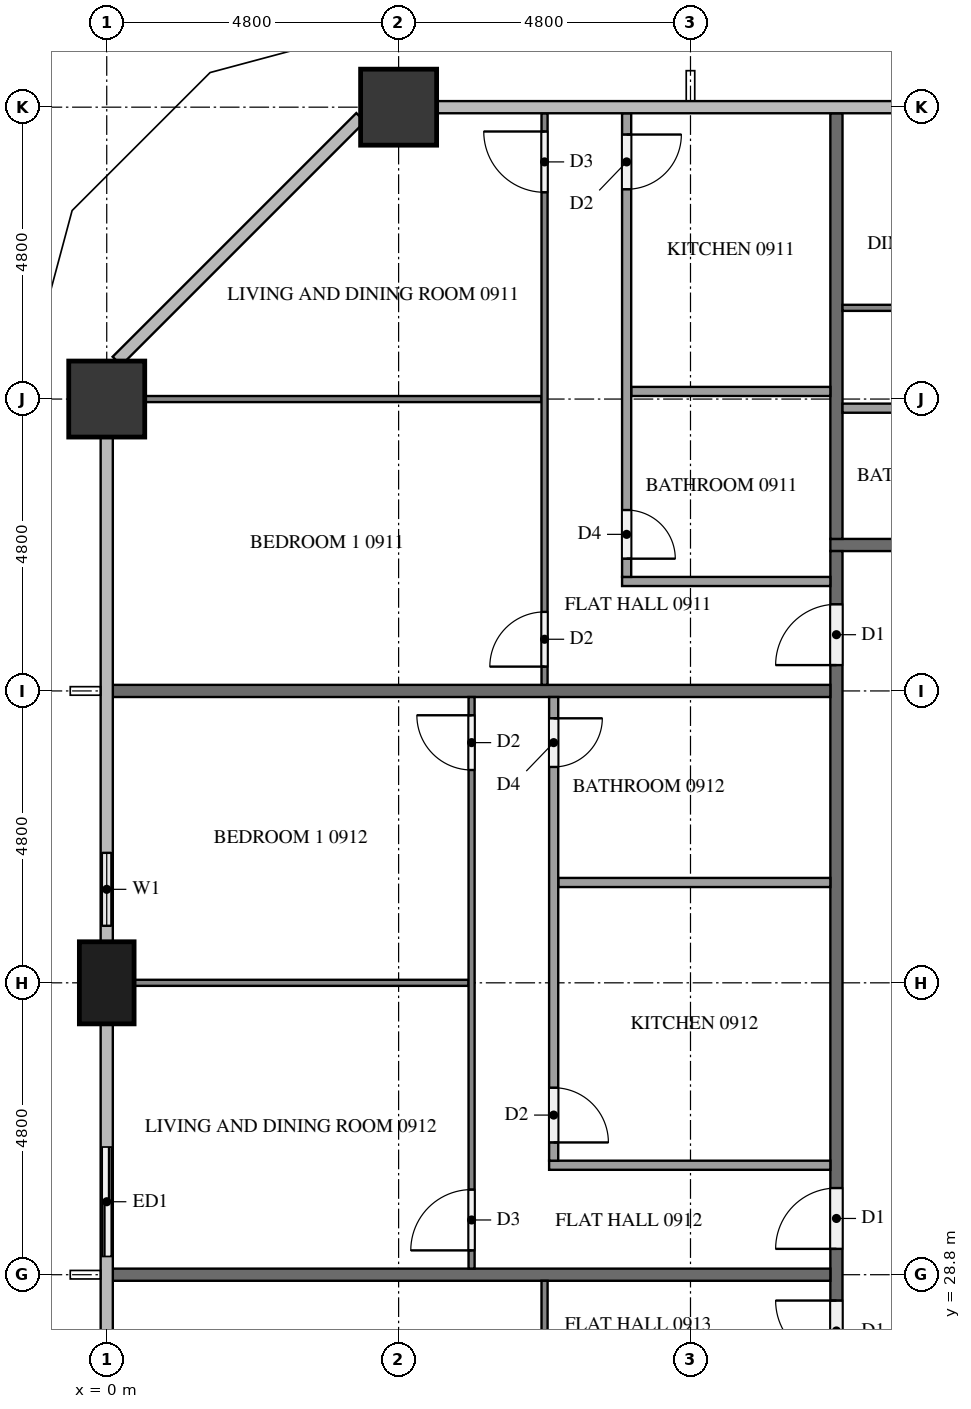
"""IFC4 building model, lengths in metres.
Left out: names, types, materials, properties, quantities, classifications, styles, units other than length and angle.
Written with IfcOpenShell. Run it as: python <this file> out.ifc"""

import sys

from ifc_helpers import new_model, si_unit, direction, frame, frame_2d, origin, origin_2d, place, context, subcontext, project, spatial, rectangle, extrude, element, fill, save


model = new_model("IFC4")
c1 = context("Model", 3, precision=1e-05, world=origin(), true_north=direction((0.0, 1.0)))
c2 = subcontext(c1, "Body", "Model", "MODEL_VIEW")
j1 = project(units=[si_unit("LENGTHUNIT", "METRE"), si_unit("PLANEANGLEUNIT", "RADIAN")], contexts=[c1])
p1 = place(None, origin())
s1 = spatial("IfcSite", under=j1, at=p1, CompositionType="ELEMENT")
p2 = place(p1, origin())
s2 = spatial("IfcBuilding", under=s1, at=p2, CompositionType="ELEMENT")
p3 = place(p2, frame((0.0, 0.0, 39.9)))
s3 = spatial("IfcBuildingStorey", under=s2, at=p3, CompositionType="ELEMENT", Elevation=39.9)
for number, where, z_axis, x_axis in (
    (1, (4.8, 48.0, 0.0), (0.0, 0.0, 1.0), (1.0, 0.0, 0.0)),
    (2, (0.0, 43.2, 0.0), (0.0, 0.0, 1.0), (1.0, 0.0, 0.0)),
):
    element("IfcColumn", number, at=place(p3, frame(where, z_axis=z_axis, x_axis=x_axis)), inside=s3, PredefinedType="COLUMN", context=c2, shape_type="SweptSolid", body=[
        extrude(rectangle(XDim=1.25, YDim=1.25, at=origin_2d()), origin(), (0.0, 0.0, 1.0), 3.2),
    ])
p4 = place(p3, frame((0.0, 33.6, 0.0), z_axis=(0.0, 0.0, 1.0), x_axis=(0.0, 1.0, 0.0)))
e3 = element("IfcColumn", 3, at=p4, inside=s3, PredefinedType="COLUMN", context=c2, shape_type="SweptSolid", body=[
    extrude(rectangle(XDim=1.35, YDim=0.9, at=origin_2d()), origin(), (0.0, 0.0, 1.0), 3.2),
])
p5 = place(p3, frame((0.0, 36.0, 0.0), z_axis=(0.0, 0.0, 1.0), x_axis=(0.0, -1.0, 0.0)))
e4 = element("IfcWall", 4, at=p5, inside=s3, PredefinedType="SOLIDWALL", context=c2, shape_type="SweptSolid", body=[
    extrude(rectangle(XDim=1.725, YDim=0.15, at=frame_2d((0.863, 0.0))), origin(), (0.0, 0.0, 1.0), 3.2),
])
p6 = place(p5, frame((0.262, 0.0, 0.9)))
e5 = element("IfcOpeningElement", 5, at=p6, cuts=e4, PredefinedType="OPENING", context=c2, shape_type="SweptSolid", body=[
    extrude(rectangle(XDim=1.2, YDim=1.4, at=frame_2d((0.6, 0.7))), frame((0.0, 0.085, 0.0), z_axis=(0.0, -1.0, 0.0), x_axis=(1.0, 0.0, 0.0)), (0.0, 0.0, 1.0), 0.17),
])
p7 = place(p3, frame((0.0, 31.2, 0.0), z_axis=(0.0, 0.0, 1.0), x_axis=(0.0, -1.0, 0.0)))
e6 = element("IfcWall", 6, at=p7, inside=s3, PredefinedType="SOLIDWALL", context=c2, shape_type="SweptSolid", body=[
    extrude(rectangle(XDim=2.4, YDim=0.15, at=frame_2d((1.2, 0.0))), origin(), (0.0, 0.0, 1.0), 3.2),
])
p8 = place(p7, frame((0.3, 0.0, 0.0)))
e7 = element("IfcOpeningElement", 7, at=p8, cuts=e6, PredefinedType="OPENING", context=c2, shape_type="SweptSolid", body=[
    extrude(rectangle(XDim=1.8, YDim=2.4, at=frame_2d((0.9, 1.2))), frame((0.0, 0.085, 0.0), z_axis=(0.0, -1.0, 0.0), x_axis=(1.0, 0.0, 0.0)), (0.0, 0.0, 1.0), 0.17),
])
p9 = place(p3, frame((11.9, 40.8, 0.0), z_axis=(0.0, 0.0, 1.0), x_axis=(1.0, 0.0, 0.0)))
e8 = element("IfcWall", 8, at=p9, inside=s3, PredefinedType="PARTITIONING", context=c2, shape_type="SweptSolid", body=[
    extrude(rectangle(XDim=38.6, YDim=0.2, at=frame_2d((19.3, 0.0))), origin(), (0.0, 0.0, 1.0), 3.2),
])
p10 = place(p9, frame((22.125, 0.0, 0.0)))
e9 = element("IfcOpeningElement", 9, at=p10, cuts=e8, PredefinedType="OPENING", context=c2, shape_type="SweptSolid", body=[
    extrude(rectangle(XDim=1.0, YDim=2.1, at=frame_2d((0.5, 1.05))), frame((0.0, 0.11, 0.0), z_axis=(0.0, -1.0, 0.0), x_axis=(1.0, 0.0, 0.0)), (0.0, 0.0, 1.0), 0.22),
])
p11 = place(p9, frame((10.125, 0.0, 0.0)))
e10 = element("IfcOpeningElement", 10, at=p11, cuts=e8, PredefinedType="OPENING", context=c2, shape_type="SweptSolid", body=[
    extrude(rectangle(XDim=1.0, YDim=2.1, at=frame_2d((0.5, 1.05))), frame((0.0, 0.11, 0.0), z_axis=(0.0, -1.0, 0.0), x_axis=(1.0, 0.0, 0.0)), (0.0, 0.0, 1.0), 0.22),
])
p12 = place(p9, frame((8.275, 0.0, 0.0)))
e11 = element("IfcOpeningElement", 11, at=p12, cuts=e8, PredefinedType="OPENING", context=c2, shape_type="SweptSolid", body=[
    extrude(rectangle(XDim=1.0, YDim=2.1, at=frame_2d((0.5, 1.05))), frame((0.0, 0.11, 0.0), z_axis=(0.0, -1.0, 0.0), x_axis=(1.0, 0.0, 0.0)), (0.0, 0.0, 1.0), 0.22),
])
p13 = place(p3, frame((12.0, 12.1, 0.0), z_axis=(0.0, 0.0, 1.0), x_axis=(0.0, 1.0, 0.0)))
e12 = element("IfcWall", 12, at=p13, inside=s3, PredefinedType="PARTITIONING", context=c2, shape_type="SweptSolid", body=[
    extrude(rectangle(XDim=28.6, YDim=0.2, at=frame_2d((14.3, 0.0))), origin(), (0.0, 0.0, 1.0), 3.2),
])
p14 = place(p13, frame((26.725, 0.0, 0.0)))
e13 = element("IfcOpeningElement", 13, at=p14, cuts=e12, PredefinedType="OPENING", context=c2, shape_type="SweptSolid", body=[
    extrude(rectangle(XDim=1.0, YDim=2.1, at=frame_2d((0.5, 1.05))), frame((0.0, 0.11, 0.0), z_axis=(0.0, -1.0, 0.0), x_axis=(1.0, 0.0, 0.0)), (0.0, 0.0, 1.0), 0.22),
])
p15 = place(p13, frame((17.125, 0.0, 0.0)))
e14 = element("IfcOpeningElement", 14, at=p15, cuts=e12, PredefinedType="OPENING", context=c2, shape_type="SweptSolid", body=[
    extrude(rectangle(XDim=1.0, YDim=2.1, at=frame_2d((0.5, 1.05))), frame((0.0, 0.11, 0.0), z_axis=(0.0, -1.0, 0.0), x_axis=(1.0, 0.0, 0.0)), (0.0, 0.0, 1.0), 0.22),
])
p16 = place(p13, frame((15.275, 0.0, 0.0)))
e15 = element("IfcOpeningElement", 15, at=p16, cuts=e12, PredefinedType="OPENING", context=c2, shape_type="SweptSolid", body=[
    extrude(rectangle(XDim=1.0, YDim=2.1, at=frame_2d((0.5, 1.05))), frame((0.0, 0.11, 0.0), z_axis=(0.0, -1.0, 0.0), x_axis=(1.0, 0.0, 0.0)), (0.0, 0.0, 1.0), 0.22),
])
p17 = place(p13, frame((5.675, 0.0, 0.0)))
e16 = element("IfcOpeningElement", 16, at=p17, cuts=e12, PredefinedType="OPENING", context=c2, shape_type="SweptSolid", body=[
    extrude(rectangle(XDim=1.0, YDim=2.1, at=frame_2d((0.5, 1.05))), frame((0.0, 0.11, 0.0), z_axis=(0.0, -1.0, 0.0), x_axis=(1.0, 0.0, 0.0)), (0.0, 0.0, 1.0), 0.22),
])
p18 = place(p3, frame((12.0, 47.9, 0.0), z_axis=(0.0, 0.0, 1.0), x_axis=(0.0, -1.0, 0.0)))
e17 = element("IfcWall", 17, at=p18, inside=s3, PredefinedType="PARTITIONING", context=c2, shape_type="SweptSolid", body=[
    extrude(rectangle(XDim=7.0, YDim=0.2, at=frame_2d((3.5, 0.0))), origin(), (0.0, 0.0, 1.0), 3.2),
])
for number, where, z_axis, x_axis in (
    (18, (0.1, 38.4, 0.0), (0.0, 0.0, 1.0), (1.0, 0.0, 0.0)),
    (19, (0.1, 28.8, 0.0), (0.0, 0.0, 1.0), (1.0, 0.0, 0.0)),
):
    element("IfcWall", number, at=place(p3, frame(where, z_axis=z_axis, x_axis=x_axis)), inside=s3, PredefinedType="PARTITIONING", context=c2, shape_type="SweptSolid", body=[
        extrude(rectangle(XDim=11.8, YDim=0.2, at=frame_2d((5.9, 0.0))), origin(), (0.0, 0.0, 1.0), 3.2),
    ])
p19 = place(p3, frame((12.1, 44.7, 0.0), z_axis=(0.0, 0.0, 1.0), x_axis=(1.0, 0.0, 0.0)))
e20 = element("IfcWall", 20, at=p19, inside=s3, PredefinedType="PARTITIONING", context=c2, shape_type="SweptSolid", body=[
    extrude(rectangle(XDim=9.4, YDim=0.1, at=frame_2d((4.7, 0.0))), origin(), (0.0, 0.0, 1.0), 3.2),
])
p20 = place(p19, frame((5.05, 0.0, 0.0)))
e21 = element("IfcOpeningElement", 21, at=p20, cuts=e20, PredefinedType="OPENING", context=c2, shape_type="SweptSolid", body=[
    extrude(rectangle(XDim=0.9, YDim=2.1, at=frame_2d((0.45, 1.05))), frame((0.0, 0.06, 0.0), z_axis=(0.0, -1.0, 0.0), x_axis=(1.0, 0.0, 0.0)), (0.0, 0.0, 1.0), 0.12),
])
p21 = place(p19, frame((3.35, 0.0, 0.0)))
e22 = element("IfcOpeningElement", 22, at=p21, cuts=e20, PredefinedType="OPENING", context=c2, shape_type="SweptSolid", body=[
    extrude(rectangle(XDim=1.0, YDim=2.1, at=frame_2d((0.5, 1.05))), frame((0.0, 0.06, 0.0), z_axis=(0.0, -1.0, 0.0), x_axis=(1.0, 0.0, 0.0)), (0.0, 0.0, 1.0), 0.12),
])
p22 = place(p3, frame((19.725, 43.05, 0.0), z_axis=(0.0, 0.0, 1.0), x_axis=(-1.0, 0.0, 0.0)))
e23 = element("IfcWall", 23, at=p22, inside=s3, PredefinedType="PARTITIONING", context=c2, shape_type="SweptSolid", body=[
    extrude(rectangle(XDim=7.625, YDim=0.15, at=frame_2d((3.812, 0.0))), origin(), (0.0, 0.0, 1.0), 3.2),
])
p23 = place(p22, frame((3.35, 0.0, 0.0)))
e24 = element("IfcOpeningElement", 24, at=p23, cuts=e23, PredefinedType="OPENING", context=c2, shape_type="SweptSolid", body=[
    extrude(rectangle(XDim=0.9, YDim=2.1, at=frame_2d((0.45, 1.05))), frame((0.0, 0.085, 0.0), z_axis=(0.0, -1.0, 0.0), x_axis=(1.0, 0.0, 0.0)), (0.0, 0.0, 1.0), 0.17),
])
p24 = place(p22, frame((4.9, 0.0, 0.0)))
e25 = element("IfcOpeningElement", 25, at=p24, cuts=e23, PredefinedType="OPENING", context=c2, shape_type="SweptSolid", body=[
    extrude(rectangle(XDim=0.8, YDim=2.1, at=frame_2d((0.4, 1.05))), frame((0.0, 0.085, 0.0), z_axis=(0.0, -1.0, 0.0), x_axis=(1.0, 0.0, 0.0)), (0.0, 0.0, 1.0), 0.17),
])
p25 = place(p3, frame((7.15, 43.2, 0.0), z_axis=(0.0, 0.0, 1.0), x_axis=(-1.0, 0.0, 0.0)))
e26 = element("IfcWall", 26, at=p25, inside=s3, PredefinedType="PARTITIONING", context=c2, shape_type="SweptSolid", body=[
    extrude(rectangle(XDim=6.525, YDim=0.1, at=frame_2d((3.262, 0.0))), origin(), (0.0, 0.0, 1.0), 3.2),
])
p26 = place(p3, frame((7.2, 38.5, 0.0), z_axis=(0.0, 0.0, 1.0), x_axis=(0.0, 1.0, 0.0)))
e27 = element("IfcWall", 27, at=p26, inside=s3, PredefinedType="PARTITIONING", context=c2, shape_type="SweptSolid", body=[
    extrude(rectangle(XDim=9.4, YDim=0.1, at=frame_2d((4.7, 0.0))), origin(), (0.0, 0.0, 1.0), 3.2),
])
p27 = place(p26, frame((0.3, 0.0, 0.0)))
e28 = element("IfcOpeningElement", 28, at=p27, cuts=e27, PredefinedType="OPENING", context=c2, shape_type="SweptSolid", body=[
    extrude(rectangle(XDim=0.9, YDim=2.1, at=frame_2d((0.45, 1.05))), frame((0.0, 0.06, 0.0), z_axis=(0.0, -1.0, 0.0), x_axis=(1.0, 0.0, 0.0)), (0.0, 0.0, 1.0), 0.12),
])
p28 = place(p26, frame((8.1, 0.0, 0.0)))
e29 = element("IfcOpeningElement", 29, at=p28, cuts=e27, PredefinedType="OPENING", context=c2, shape_type="SweptSolid", body=[
    extrude(rectangle(XDim=1.0, YDim=2.1, at=frame_2d((0.5, 1.05))), frame((0.0, 0.06, 0.0), z_axis=(0.0, -1.0, 0.0), x_axis=(1.0, 0.0, 0.0)), (0.0, 0.0, 1.0), 0.12),
])
p29 = place(p3, frame((11.9, 43.325, 0.0), z_axis=(0.0, 0.0, 1.0), x_axis=(-1.0, 0.0, 0.0)))
e30 = element("IfcWall", 30, at=p29, inside=s3, PredefinedType="PARTITIONING", context=c2, shape_type="SweptSolid", body=[
    extrude(rectangle(XDim=3.275, YDim=0.15, at=frame_2d((1.637, 0.0))), origin(), (0.0, 0.0, 1.0), 3.2),
])
p30 = place(p3, frame((11.9, 40.2, 0.0), z_axis=(0.0, 0.0, 1.0), x_axis=(-1.0, 0.0, 0.0)))
e31 = element("IfcWall", 31, at=p30, inside=s3, PredefinedType="PARTITIONING", context=c2, shape_type="SweptSolid", body=[
    extrude(rectangle(XDim=3.425, YDim=0.15, at=frame_2d((1.712, 0.0))), origin(), (0.0, 0.0, 1.0), 3.2),
])
p31 = place(p3, frame((8.55, 47.9, 0.0), z_axis=(0.0, 0.0, 1.0), x_axis=(0.0, -1.0, 0.0)))
e32 = element("IfcWall", 32, at=p31, inside=s3, PredefinedType="PARTITIONING", context=c2, shape_type="SweptSolid", body=[
    extrude(rectangle(XDim=7.625, YDim=0.15, at=frame_2d((3.812, 0.0))), origin(), (0.0, 0.0, 1.0), 3.2),
])
p32 = place(p31, frame((6.525, 0.0, 0.0)))
e33 = element("IfcOpeningElement", 33, at=p32, cuts=e32, PredefinedType="OPENING", context=c2, shape_type="SweptSolid", body=[
    extrude(rectangle(XDim=0.8, YDim=2.1, at=frame_2d((0.4, 1.05))), frame((0.0, 0.085, 0.0), z_axis=(0.0, -1.0, 0.0), x_axis=(1.0, 0.0, 0.0)), (0.0, 0.0, 1.0), 0.17),
])
p33 = place(p31, frame((0.35, 0.0, 0.0)))
e34 = element("IfcOpeningElement", 34, at=p33, cuts=e32, PredefinedType="OPENING", context=c2, shape_type="SweptSolid", body=[
    extrude(rectangle(XDim=0.9, YDim=2.1, at=frame_2d((0.45, 1.05))), frame((0.0, 0.085, 0.0), z_axis=(0.0, -1.0, 0.0), x_axis=(1.0, 0.0, 0.0)), (0.0, 0.0, 1.0), 0.17),
])
p34 = place(p3, frame((5.95, 33.6, 0.0), z_axis=(0.0, 0.0, 1.0), x_axis=(-1.0, 0.0, 0.0)))
e35 = element("IfcWall", 35, at=p34, inside=s3, PredefinedType="PARTITIONING", context=c2, shape_type="SweptSolid", body=[
    extrude(rectangle(XDim=5.5, YDim=0.1, at=frame_2d((2.75, 0.0))), origin(), (0.0, 0.0, 1.0), 3.2),
])
p35 = place(p3, frame((6.0, 28.9, 0.0), z_axis=(0.0, 0.0, 1.0), x_axis=(0.0, 1.0, 0.0)))
e36 = element("IfcWall", 36, at=p35, inside=s3, PredefinedType="PARTITIONING", context=c2, shape_type="SweptSolid", body=[
    extrude(rectangle(XDim=9.4, YDim=0.1, at=frame_2d((4.7, 0.0))), origin(), (0.0, 0.0, 1.0), 3.2),
])
p36 = place(p35, frame((0.3, 0.0, 0.0)))
e37 = element("IfcOpeningElement", 37, at=p36, cuts=e36, PredefinedType="OPENING", context=c2, shape_type="SweptSolid", body=[
    extrude(rectangle(XDim=1.0, YDim=2.1, at=frame_2d((0.5, 1.05))), frame((0.0, 0.06, 0.0), z_axis=(0.0, -1.0, 0.0), x_axis=(1.0, 0.0, 0.0)), (0.0, 0.0, 1.0), 0.12),
])
p37 = place(p35, frame((8.2, 0.0, 0.0)))
e38 = element("IfcOpeningElement", 38, at=p37, cuts=e36, PredefinedType="OPENING", context=c2, shape_type="SweptSolid", body=[
    extrude(rectangle(XDim=0.9, YDim=2.1, at=frame_2d((0.45, 1.05))), frame((0.0, 0.06, 0.0), z_axis=(0.0, -1.0, 0.0), x_axis=(1.0, 0.0, 0.0)), (0.0, 0.0, 1.0), 0.12),
])
p38 = place(p3, frame((11.9, 35.25, 0.0), z_axis=(0.0, 0.0, 1.0), x_axis=(-1.0, 0.0, 0.0)))
e39 = element("IfcWall", 39, at=p38, inside=s3, PredefinedType="PARTITIONING", context=c2, shape_type="SweptSolid", body=[
    extrude(rectangle(XDim=4.475, YDim=0.15, at=frame_2d((2.237, 0.0))), origin(), (0.0, 0.0, 1.0), 3.2),
])
p39 = place(p3, frame((11.9, 30.6, 0.0), z_axis=(0.0, 0.0, 1.0), x_axis=(-1.0, 0.0, 0.0)))
e40 = element("IfcWall", 40, at=p39, inside=s3, PredefinedType="PARTITIONING", context=c2, shape_type="SweptSolid", body=[
    extrude(rectangle(XDim=4.625, YDim=0.15, at=frame_2d((2.312, 0.0))), origin(), (0.0, 0.0, 1.0), 3.2),
])
p40 = place(p3, frame((7.35, 38.3, 0.0), z_axis=(0.0, 0.0, 1.0), x_axis=(0.0, -1.0, 0.0)))
e41 = element("IfcWall", 41, at=p40, inside=s3, PredefinedType="PARTITIONING", context=c2, shape_type="SweptSolid", body=[
    extrude(rectangle(XDim=7.625, YDim=0.15, at=frame_2d((3.812, 0.0))), origin(), (0.0, 0.0, 1.0), 3.2),
])
p41 = place(p40, frame((6.425, 0.0, 0.0)))
e42 = element("IfcOpeningElement", 42, at=p41, cuts=e41, PredefinedType="OPENING", context=c2, shape_type="SweptSolid", body=[
    extrude(rectangle(XDim=0.9, YDim=2.1, at=frame_2d((0.45, 1.05))), frame((0.0, 0.085, 0.0), z_axis=(0.0, -1.0, 0.0), x_axis=(1.0, 0.0, 0.0)), (0.0, 0.0, 1.0), 0.17),
])
p42 = place(p40, frame((0.35, 0.0, 0.0)))
e43 = element("IfcOpeningElement", 43, at=p42, cuts=e41, PredefinedType="OPENING", context=c2, shape_type="SweptSolid", body=[
    extrude(rectangle(XDim=0.8, YDim=2.1, at=frame_2d((0.4, 1.05))), frame((0.0, 0.085, 0.0), z_axis=(0.0, -1.0, 0.0), x_axis=(1.0, 0.0, 0.0)), (0.0, 0.0, 1.0), 0.17),
])
p43 = place(p3, frame((7.2, 19.3, 0.0), z_axis=(0.0, 0.0, 1.0), x_axis=(0.0, 1.0, 0.0)))
e44 = element("IfcWall", 44, at=p43, inside=s3, PredefinedType="PARTITIONING", context=c2, shape_type="SweptSolid", body=[
    extrude(rectangle(XDim=9.4, YDim=0.1, at=frame_2d((4.7, 0.0))), origin(), (0.0, 0.0, 1.0), 3.2),
])
p44 = place(p43, frame((5.05, 0.0, 0.0)))
e45 = element("IfcOpeningElement", 45, at=p44, cuts=e44, PredefinedType="OPENING", context=c2, shape_type="SweptSolid", body=[
    extrude(rectangle(XDim=1.0, YDim=2.1, at=frame_2d((0.5, 1.05))), frame((0.0, 0.06, 0.0), z_axis=(0.0, -1.0, 0.0), x_axis=(1.0, 0.0, 0.0)), (0.0, 0.0, 1.0), 0.12),
])
p45 = place(p43, frame((3.45, 0.0, 0.0)))
e46 = element("IfcOpeningElement", 46, at=p45, cuts=e44, PredefinedType="OPENING", context=c2, shape_type="SweptSolid", body=[
    extrude(rectangle(XDim=0.9, YDim=2.1, at=frame_2d((0.45, 1.05))), frame((0.0, 0.06, 0.0), z_axis=(0.0, -1.0, 0.0), x_axis=(1.0, 0.0, 0.0)), (0.0, 0.0, 1.0), 0.12),
])
p46 = place(p6, origin())
e47 = element("IfcWindow", 47, at=p46, inside=s3, PartitioningType="SINGLE_PANEL", PredefinedType="WINDOW", context=c2, shape_type="SweptSolid", body=[
    extrude(rectangle(XDim=1.2, YDim=1.4, at=frame_2d((0.6, 0.7))), frame((0.0, 0.03, 0.0), z_axis=(0.0, -1.0, 0.0), x_axis=(1.0, 0.0, 0.0)), (0.0, 0.0, 1.0), 0.06),
])
fill(e5, e47)
p47 = place(p8, origin())
e48 = element("IfcDoor", 48, at=p47, inside=s3, OperationType="SLIDING_TO_RIGHT", PredefinedType="DOOR", context=c2, shape_type="SweptSolid", body=[
    extrude(rectangle(XDim=1.8, YDim=2.4, at=frame_2d((0.9, 1.2))), frame((0.0, 0.025, 0.0), z_axis=(0.0, -1.0, 0.0), x_axis=(1.0, 0.0, 0.0)), (0.0, 0.0, 1.0), 0.05),
])
fill(e7, e48)
p48 = place(p14, origin())
e49 = element("IfcDoor", 49, at=p48, inside=s3, OperationType="SINGLE_SWING_LEFT", PredefinedType="DOOR", context=c2, shape_type="SweptSolid", body=[
    extrude(rectangle(XDim=1.0, YDim=2.1, at=frame_2d((0.5, 1.05))), frame((0.0, 0.025, 0.0), z_axis=(0.0, -1.0, 0.0), x_axis=(1.0, 0.0, 0.0)), (0.0, 0.0, 1.0), 0.05),
])
fill(e13, e49)
p49 = place(p15, origin())
e50 = element("IfcDoor", 50, at=p49, inside=s3, OperationType="SINGLE_SWING_LEFT", PredefinedType="DOOR", context=c2, shape_type="SweptSolid", body=[
    extrude(rectangle(XDim=1.0, YDim=2.1, at=frame_2d((0.5, 1.05))), frame((0.0, 0.025, 0.0), z_axis=(0.0, -1.0, 0.0), x_axis=(1.0, 0.0, 0.0)), (0.0, 0.0, 1.0), 0.05),
])
fill(e14, e50)
p50 = place(p16, origin())
e51 = element("IfcDoor", 51, at=p50, inside=s3, OperationType="SINGLE_SWING_RIGHT", PredefinedType="DOOR", context=c2, shape_type="SweptSolid", body=[
    extrude(rectangle(XDim=1.0, YDim=2.1, at=frame_2d((0.5, 1.05))), frame((0.0, 0.025, 0.0), z_axis=(0.0, -1.0, 0.0), x_axis=(1.0, 0.0, 0.0)), (0.0, 0.0, 1.0), 0.05),
])
fill(e15, e51)
p51 = place(p27, origin())
e52 = element("IfcDoor", 52, at=p51, inside=s3, OperationType="SINGLE_SWING_LEFT", PredefinedType="DOOR", context=c2, shape_type="SweptSolid", body=[
    extrude(rectangle(XDim=0.9, YDim=2.1, at=frame_2d((0.45, 1.05))), frame((0.0, 0.025, 0.0), z_axis=(0.0, -1.0, 0.0), x_axis=(1.0, 0.0, 0.0)), (0.0, 0.0, 1.0), 0.05),
])
fill(e28, e52)
p52 = place(p28, origin())
e53 = element("IfcDoor", 53, at=p52, inside=s3, OperationType="SINGLE_SWING_RIGHT", PredefinedType="DOOR", context=c2, shape_type="SweptSolid", body=[
    extrude(rectangle(XDim=1.0, YDim=2.1, at=frame_2d((0.5, 1.05))), frame((0.0, 0.025, 0.0), z_axis=(0.0, -1.0, 0.0), x_axis=(1.0, 0.0, 0.0)), (0.0, 0.0, 1.0), 0.05),
])
fill(e29, e53)
p53 = place(p32, origin())
e54 = element("IfcDoor", 54, at=p53, inside=s3, OperationType="SINGLE_SWING_RIGHT", PredefinedType="DOOR", context=c2, shape_type="SweptSolid", body=[
    extrude(rectangle(XDim=0.8, YDim=2.1, at=frame_2d((0.4, 1.05))), frame((0.0, 0.025, 0.0), z_axis=(0.0, -1.0, 0.0), x_axis=(1.0, 0.0, 0.0)), (0.0, 0.0, 1.0), 0.05),
])
fill(e33, e54)
p54 = place(p33, origin())
e55 = element("IfcDoor", 55, at=p54, inside=s3, OperationType="SINGLE_SWING_LEFT", PredefinedType="DOOR", context=c2, shape_type="SweptSolid", body=[
    extrude(rectangle(XDim=0.9, YDim=2.1, at=frame_2d((0.45, 1.05))), frame((0.0, 0.025, 0.0), z_axis=(0.0, -1.0, 0.0), x_axis=(1.0, 0.0, 0.0)), (0.0, 0.0, 1.0), 0.05),
])
fill(e34, e55)
p55 = place(p36, origin())
e56 = element("IfcDoor", 56, at=p55, inside=s3, OperationType="SINGLE_SWING_LEFT", PredefinedType="DOOR", context=c2, shape_type="SweptSolid", body=[
    extrude(rectangle(XDim=1.0, YDim=2.1, at=frame_2d((0.5, 1.05))), frame((0.0, 0.025, 0.0), z_axis=(0.0, -1.0, 0.0), x_axis=(1.0, 0.0, 0.0)), (0.0, 0.0, 1.0), 0.05),
])
fill(e37, e56)
p56 = place(p37, origin())
e57 = element("IfcDoor", 57, at=p56, inside=s3, OperationType="SINGLE_SWING_RIGHT", PredefinedType="DOOR", context=c2, shape_type="SweptSolid", body=[
    extrude(rectangle(XDim=0.9, YDim=2.1, at=frame_2d((0.45, 1.05))), frame((0.0, 0.025, 0.0), z_axis=(0.0, -1.0, 0.0), x_axis=(1.0, 0.0, 0.0)), (0.0, 0.0, 1.0), 0.05),
])
fill(e38, e57)
p57 = place(p41, origin())
e58 = element("IfcDoor", 58, at=p57, inside=s3, OperationType="SINGLE_SWING_RIGHT", PredefinedType="DOOR", context=c2, shape_type="SweptSolid", body=[
    extrude(rectangle(XDim=0.9, YDim=2.1, at=frame_2d((0.45, 1.05))), frame((0.0, 0.025, 0.0), z_axis=(0.0, -1.0, 0.0), x_axis=(1.0, 0.0, 0.0)), (0.0, 0.0, 1.0), 0.05),
])
fill(e42, e58)
p58 = place(p42, origin())
e59 = element("IfcDoor", 59, at=p58, inside=s3, OperationType="SINGLE_SWING_LEFT", PredefinedType="DOOR", context=c2, shape_type="SweptSolid", body=[
    extrude(rectangle(XDim=0.8, YDim=2.1, at=frame_2d((0.4, 1.05))), frame((0.0, 0.025, 0.0), z_axis=(0.0, -1.0, 0.0), x_axis=(1.0, 0.0, 0.0)), (0.0, 0.0, 1.0), 0.05),
])
fill(e43, e59)
save(model, sys.argv[1])
